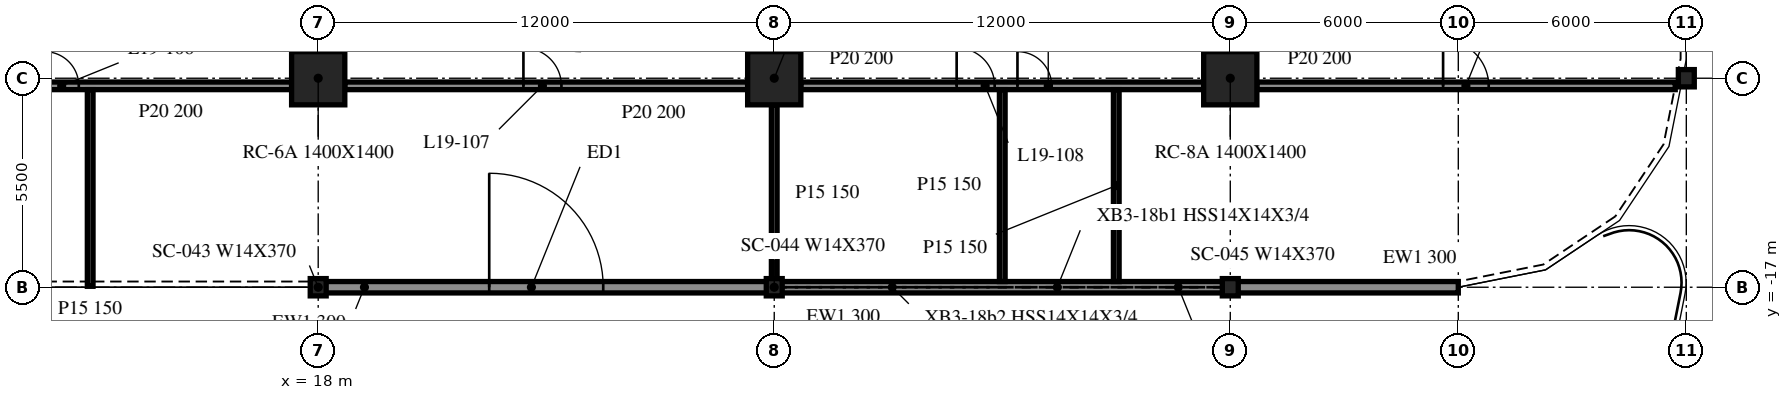
"""IFC4 building model, lengths in metres.
Left out: names, types, materials, properties, quantities, classifications, styles, units other than length and angle.
Written with IfcOpenShell. Run it as: python <this file> out.ifc"""

import sys

from ifc_helpers import new_model, si_unit, direction, frame, frame_2d, origin, origin_2d, place, context, subcontext, project, spatial, rectangle, i_section, extrude, element, fill, save


model = new_model("IFC4")
c1 = context("Model", 3, precision=1e-05, world=origin(), true_north=direction((0.0, 1.0)))
c2 = subcontext(c1, "Body", "Model", "MODEL_VIEW")
j1 = project(units=[si_unit("LENGTHUNIT", "METRE"), si_unit("PLANEANGLEUNIT", "RADIAN")], contexts=[c1])
p1 = place(None, origin())
s1 = spatial("IfcSite", under=j1, at=p1, CompositionType="ELEMENT")
p2 = place(p1, origin())
s2 = spatial("IfcBuilding", under=s1, at=p2, CompositionType="ELEMENT")
p3 = place(p2, frame((0.0, 0.0, 84.8)))
s3 = spatial("IfcBuildingStorey", under=s2, at=p3, CompositionType="ELEMENT", Elevation=84.8)
for number, where, z_axis, x_axis in (
    (1, (18.0, -11.5, -0.34), (0.0, 0.0, 1.0), (1.0, 0.0, 0.0)),
    (2, (30.0, -11.5, -0.34), (0.0, 0.0, 1.0), (1.0, 0.0, 0.0)),
    (3, (42.0, -11.5, -0.34), (0.0, 0.0, 1.0), (1.0, 0.0, 0.0)),
):
    element("IfcColumn", number, at=place(p3, frame(where, z_axis=z_axis, x_axis=x_axis)), inside=s3, PredefinedType="COLUMN", context=c2, shape_type="SweptSolid", body=[
        extrude(rectangle(XDim=1.4, YDim=1.4, at=origin_2d()), origin(), (0.0, 0.0, 1.0), 4.1),
    ])
for number, where, z_axis, x_axis in (
    (4, (18.0, -17.0, -0.34), (0.0, 0.0, 1.0), (1.0, 0.0, 0.0)),
    (5, (30.0, -17.0, -0.34), (0.0, 0.0, 1.0), (1.0, 0.0, 0.0)),
    (6, (42.0, -17.0, -0.34), (0.0, 0.0, 1.0), (1.0, 0.0, 0.0)),
    (7, (54.0, -11.5, -0.34), (0.0, 0.0, 1.0), (1.0, 0.0, 0.0)),
):
    element("IfcColumn", number, at=place(p3, frame(where, z_axis=z_axis, x_axis=x_axis)), inside=s3, PredefinedType="COLUMN", context=c2, shape_type="SweptSolid", body=[
        extrude(i_section(OverallWidth=0.419, OverallDepth=0.455, WebThickness=0.042, FlangeThickness=0.068, at=origin_2d()), origin(), (0.0, 0.0, 1.0), 4.1),
    ])
p4 = place(p3, frame((18.021, -17.0, 0.0), z_axis=(0.0, 0.0, 1.0), x_axis=(1.0, 0.0, 0.0)))
e8 = element("IfcWall", 8, at=p4, inside=s3, PredefinedType="NOTDEFINED", context=c2, shape_type="SweptSolid", body=[
    extrude(rectangle(XDim=11.958, YDim=0.3, at=frame_2d((5.979, 0.0))), origin(), (0.0, 0.0, 1.0), 3.003),
])
p5 = place(p4, frame((4.479, 0.0, 0.0)))
e9 = element("IfcOpeningElement", 9, at=p5, cuts=e8, PredefinedType="OPENING", context=c2, shape_type="SweptSolid", body=[
    extrude(rectangle(XDim=3.0, YDim=2.4, at=frame_2d((1.5, 1.2))), frame((0.0, 0.16, 0.0), z_axis=(0.0, -1.0, 0.0), x_axis=(1.0, 0.0, 0.0)), (0.0, 0.0, 1.0), 0.32),
])
p6 = place(p3, frame((30.021, -17.0, 0.0), z_axis=(0.0, 0.0, 1.0), x_axis=(1.0, 0.0, 0.0)))
e10 = element("IfcWall", 10, at=p6, inside=s3, PredefinedType="NOTDEFINED", context=c2, shape_type="SweptSolid", body=[
    extrude(rectangle(XDim=11.958, YDim=0.3, at=frame_2d((5.979, 0.0))), origin(), (0.0, 0.0, 1.0), 3.003),
])
p7 = place(p3, frame((42.021, -17.0, 0.0), z_axis=(0.0, 0.0, 1.0), x_axis=(1.0, 0.0, 0.0)))
e11 = element("IfcWall", 11, at=p7, inside=s3, PredefinedType="NOTDEFINED", context=c2, shape_type="SweptSolid", body=[
    extrude(rectangle(XDim=5.979, YDim=0.3, at=frame_2d((2.99, 0.0))), origin(), (0.0, 0.0, 1.0), 3.003),
])
p8 = place(p3, frame((6.7, -11.7, 0.0), z_axis=(0.0, 0.0, 1.0), x_axis=(1.0, 0.0, 0.0)))
e12 = element("IfcWall", 12, at=p8, inside=s3, PredefinedType="PARTITIONING", context=c2, shape_type="SweptSolid", body=[
    extrude(rectangle(XDim=10.6, YDim=0.2, at=frame_2d((5.3, 0.0))), origin(), (0.0, 0.0, 1.0), 3.76),
])
p9 = place(p8, frame((0.9, 0.0, 0.0)))
e13 = element("IfcOpeningElement", 13, at=p9, cuts=e12, PredefinedType="OPENING", context=c2, shape_type="SweptSolid", body=[
    extrude(rectangle(XDim=1.2, YDim=2.1, at=frame_2d((0.6, 1.05))), frame((0.0, 0.11, 0.0), z_axis=(0.0, -1.0, 0.0), x_axis=(1.0, 0.0, 0.0)), (0.0, 0.0, 1.0), 0.22),
])
p10 = place(p8, frame((4.1, 0.0, 0.0)))
e14 = element("IfcOpeningElement", 14, at=p10, cuts=e12, PredefinedType="OPENING", context=c2, shape_type="SweptSolid", body=[
    extrude(rectangle(XDim=0.9, YDim=2.1, at=frame_2d((0.45, 1.05))), frame((0.0, 0.11, 0.0), z_axis=(0.0, -1.0, 0.0), x_axis=(1.0, 0.0, 0.0)), (0.0, 0.0, 1.0), 0.22),
])
p11 = place(p3, frame((18.7, -11.7, 0.0), z_axis=(0.0, 0.0, 1.0), x_axis=(1.0, 0.0, 0.0)))
e15 = element("IfcWall", 15, at=p11, inside=s3, PredefinedType="PARTITIONING", context=c2, shape_type="SweptSolid", body=[
    extrude(rectangle(XDim=10.6, YDim=0.2, at=frame_2d((5.3, 0.0))), origin(), (0.0, 0.0, 1.0), 3.76),
])
p12 = place(p11, frame((4.7, 0.0, 0.0)))
e16 = element("IfcOpeningElement", 16, at=p12, cuts=e15, PredefinedType="OPENING", context=c2, shape_type="SweptSolid", body=[
    extrude(rectangle(XDim=1.0, YDim=2.1, at=frame_2d((0.5, 1.05))), frame((0.0, 0.11, 0.0), z_axis=(0.0, -1.0, 0.0), x_axis=(1.0, 0.0, 0.0)), (0.0, 0.0, 1.0), 0.22),
])
p13 = place(p3, frame((30.7, -11.7, 0.0), z_axis=(0.0, 0.0, 1.0), x_axis=(1.0, 0.0, 0.0)))
e17 = element("IfcWall", 17, at=p13, inside=s3, PredefinedType="PARTITIONING", context=c2, shape_type="SweptSolid", body=[
    extrude(rectangle(XDim=10.6, YDim=0.2, at=frame_2d((5.3, 0.0))), origin(), (0.0, 0.0, 1.0), 3.76),
])
p14 = place(p13, frame((4.1, 0.0, 0.0)))
e18 = element("IfcOpeningElement", 18, at=p14, cuts=e17, PredefinedType="OPENING", context=c2, shape_type="SweptSolid", body=[
    extrude(rectangle(XDim=1.0, YDim=2.1, at=frame_2d((0.5, 1.05))), frame((0.0, 0.11, 0.0), z_axis=(0.0, -1.0, 0.0), x_axis=(1.0, 0.0, 0.0)), (0.0, 0.0, 1.0), 0.22),
])
p15 = place(p13, frame((5.7, 0.0, 0.0)))
e19 = element("IfcOpeningElement", 19, at=p15, cuts=e17, PredefinedType="OPENING", context=c2, shape_type="SweptSolid", body=[
    extrude(rectangle(XDim=0.9, YDim=2.1, at=frame_2d((0.45, 1.05))), frame((0.0, 0.11, 0.0), z_axis=(0.0, -1.0, 0.0), x_axis=(1.0, 0.0, 0.0)), (0.0, 0.0, 1.0), 0.22),
])
p16 = place(p3, frame((42.7, -11.7, 0.0), z_axis=(0.0, 0.0, 1.0), x_axis=(1.0, 0.0, 0.0)))
e20 = element("IfcWall", 20, at=p16, inside=s3, PredefinedType="PARTITIONING", context=c2, shape_type="SweptSolid", body=[
    extrude(rectangle(XDim=11.008, YDim=0.2, at=frame_2d((5.504, 0.0))), origin(), (0.0, 0.0, 1.0), 3.76),
])
p17 = place(p16, frame((4.9, 0.0, 0.0)))
e21 = element("IfcOpeningElement", 21, at=p17, cuts=e20, PredefinedType="OPENING", context=c2, shape_type="SweptSolid", body=[
    extrude(rectangle(XDim=1.2, YDim=2.1, at=frame_2d((0.6, 1.05))), frame((0.0, 0.11, 0.0), z_axis=(0.0, -1.0, 0.0), x_axis=(1.0, 0.0, 0.0)), (0.0, 0.0, 1.0), 0.22),
])
p18 = place(p3, frame((12.0, -16.975, 0.0), z_axis=(0.0, 0.0, 1.0), x_axis=(0.0, 1.0, 0.0)))
e22 = element("IfcWall", 22, at=p18, inside=s3, PredefinedType="PARTITIONING", context=c2, shape_type="SweptSolid", body=[
    extrude(rectangle(XDim=5.175, YDim=0.15, at=frame_2d((2.587, 0.0))), origin(), (0.0, 0.0, 1.0), 3.76),
])
p19 = place(p3, frame((30.0, -16.85, 0.0), z_axis=(0.0, 0.0, 1.0), x_axis=(0.0, 1.0, 0.0)))
e23 = element("IfcWall", 23, at=p19, inside=s3, PredefinedType="PARTITIONING", context=c2, shape_type="SweptSolid", body=[
    extrude(rectangle(XDim=4.65, YDim=0.15, at=frame_2d((2.325, 0.0))), origin(), (0.0, 0.0, 1.0), 3.76),
])
for number, where, z_axis, x_axis in (
    (24, (36.0, -16.85, 0.0), (0.0, 0.0, 1.0), (0.0, 1.0, 0.0)),
    (25, (39.0, -16.85, 0.0), (0.0, 0.0, 1.0), (0.0, 1.0, 0.0)),
):
    element("IfcWall", number, at=place(p3, frame(where, z_axis=z_axis, x_axis=x_axis)), inside=s3, PredefinedType="PARTITIONING", context=c2, shape_type="SweptSolid", body=[
        extrude(rectangle(XDim=5.05, YDim=0.15, at=frame_2d((2.525, 0.0))), origin(), (0.0, 0.0, 1.0), 3.76),
    ])
p20 = place(p5, origin())
e26 = element("IfcDoor", 26, at=p20, inside=s3, OperationType="SINGLE_SWING_LEFT", PredefinedType="DOOR", context=c2, shape_type="SweptSolid", body=[
    extrude(rectangle(XDim=3.0, YDim=2.4, at=frame_2d((1.5, 1.2))), frame((0.0, 0.025, 0.0), z_axis=(0.0, -1.0, 0.0), x_axis=(1.0, 0.0, 0.0)), (0.0, 0.0, 1.0), 0.05),
])
fill(e9, e26)
p21 = place(p10, origin())
e27 = element("IfcDoor", 27, at=p21, inside=s3, OperationType="SINGLE_SWING_RIGHT", PredefinedType="DOOR", context=c2, shape_type="SweptSolid", body=[
    extrude(rectangle(XDim=0.9, YDim=2.1, at=frame_2d((0.45, 1.05))), frame((0.0, 0.025, 0.0), z_axis=(0.0, -1.0, 0.0), x_axis=(1.0, 0.0, 0.0)), (0.0, 0.0, 1.0), 0.05),
])
fill(e14, e27)
p22 = place(p12, origin())
e28 = element("IfcDoor", 28, at=p22, inside=s3, OperationType="SINGLE_SWING_RIGHT", PredefinedType="DOOR", context=c2, shape_type="SweptSolid", body=[
    extrude(rectangle(XDim=1.0, YDim=2.1, at=frame_2d((0.5, 1.05))), frame((0.0, 0.025, 0.0), z_axis=(0.0, -1.0, 0.0), x_axis=(1.0, 0.0, 0.0)), (0.0, 0.0, 1.0), 0.05),
])
fill(e16, e28)
p23 = place(p14, origin())
e29 = element("IfcDoor", 29, at=p23, inside=s3, OperationType="SINGLE_SWING_RIGHT", PredefinedType="DOOR", context=c2, shape_type="SweptSolid", body=[
    extrude(rectangle(XDim=1.0, YDim=2.1, at=frame_2d((0.5, 1.05))), frame((0.0, 0.025, 0.0), z_axis=(0.0, -1.0, 0.0), x_axis=(1.0, 0.0, 0.0)), (0.0, 0.0, 1.0), 0.05),
])
fill(e18, e29)
p24 = place(p15, origin())
e30 = element("IfcDoor", 30, at=p24, inside=s3, OperationType="SINGLE_SWING_LEFT", PredefinedType="DOOR", context=c2, shape_type="SweptSolid", body=[
    extrude(rectangle(XDim=0.9, YDim=2.1, at=frame_2d((0.45, 1.05))), frame((0.0, 0.025, 0.0), z_axis=(0.0, -1.0, 0.0), x_axis=(1.0, 0.0, 0.0)), (0.0, 0.0, 1.0), 0.05),
])
fill(e19, e30)
p25 = place(p17, origin())
e31 = element("IfcDoor", 31, at=p25, inside=s3, OperationType="SINGLE_SWING_RIGHT", PredefinedType="DOOR", context=c2, shape_type="SweptSolid", body=[
    extrude(rectangle(XDim=1.2, YDim=2.1, at=frame_2d((0.6, 1.05))), frame((0.0, 0.025, 0.0), z_axis=(0.0, -1.0, 0.0), x_axis=(1.0, 0.0, 0.0)), (0.0, 0.0, 1.0), 0.05),
])
fill(e21, e31)
save(model, sys.argv[1])
